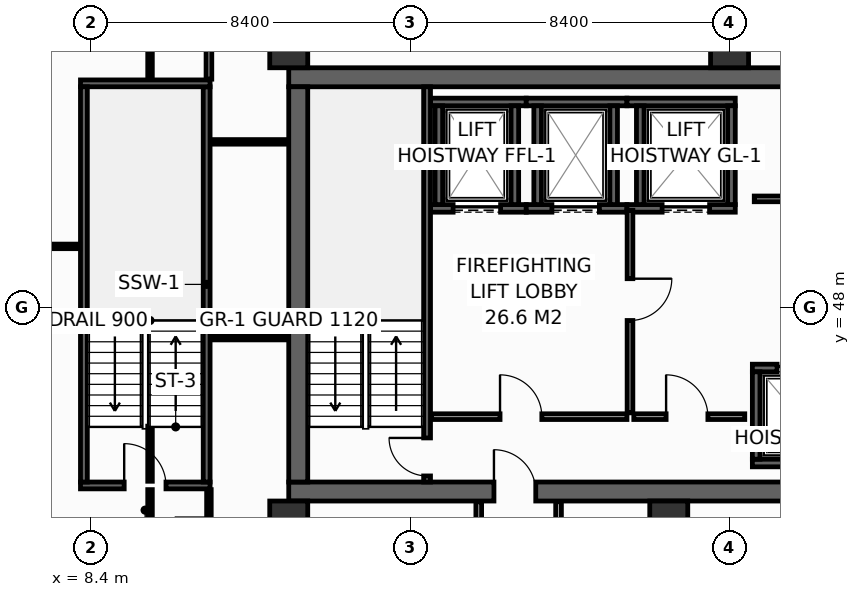
"""IFC4 building model, lengths in metres.
Left out: names, types, materials, properties, quantities, classifications, styles, units other than length and angle.
Written with IfcOpenShell. Run it as: python <this file> out.ifc"""

import sys

from ifc_helpers import new_model, si_unit, direction, frame, frame_2d, origin, origin_2d, place, context, subcontext, project, spatial, rectangle, hollow_rectangle, extrude, element, fill, save


model = new_model("IFC4")
c1 = context("Model", 3, precision=1e-05, world=origin(), true_north=direction((0.0, 1.0)))
c2 = subcontext(c1, "Body", "Model", "MODEL_VIEW")
j1 = project(units=[si_unit("LENGTHUNIT", "METRE"), si_unit("PLANEANGLEUNIT", "RADIAN")], contexts=[c1])
p1 = place(None, origin())
s1 = spatial("IfcSite", under=j1, at=p1, CompositionType="ELEMENT")
p2 = place(p1, origin())
s2 = spatial("IfcBuilding", under=s1, at=p2, CompositionType="ELEMENT")
p3 = place(p2, frame((0.0, 0.0, 175.2)))
s3 = spatial("IfcBuildingStorey", under=s2, at=p3, CompositionType="ELEMENT", Elevation=175.2)
p4 = place(p3, frame((13.6, 43.15, 0.0), z_axis=(0.0, 0.0, 1.0), x_axis=(1.0, 0.0, 0.0)))
e1 = element("IfcWall", 1, at=p4, inside=s3, PredefinedType="SHEAR", context=c2, shape_type="SweptSolid", body=[
    extrude(rectangle(XDim=32.7, YDim=0.5, at=frame_2d((16.35, 0.0))), origin(), (0.0, 0.0, 1.0), 3.55),
])
p5 = place(p4, frame((5.4, 0.0, 0.0)))
e2 = element("IfcOpeningElement", 2, at=p5, cuts=e1, PredefinedType="OPENING", context=c2, shape_type="SweptSolid", body=[
    extrude(rectangle(XDim=1.1, YDim=2.15, at=frame_2d((0.55, 1.075))), frame((0.0, 0.26, 0.0), z_axis=(0.0, -1.0, 0.0), x_axis=(1.0, 0.0, 0.0)), (0.0, 0.0, 1.0), 0.52),
])
p6 = place(p4, frame((25.6, 0.0, 0.0)))
e3 = element("IfcOpeningElement", 3, at=p6, cuts=e1, PredefinedType="OPENING", context=c2, shape_type="SweptSolid", body=[
    extrude(rectangle(XDim=1.1, YDim=2.15, at=frame_2d((0.55, 1.075))), frame((0.0, 0.26, 0.0), z_axis=(0.0, -1.0, 0.0), x_axis=(1.0, 0.0, 0.0)), (0.0, 0.0, 1.0), 0.52),
])
p7 = place(p3, frame((13.6, 54.05, 0.0), z_axis=(0.0, 0.0, 1.0), x_axis=(1.0, 0.0, 0.0)))
e4 = element("IfcWall", 4, at=p7, inside=s3, PredefinedType="SHEAR", context=c2, shape_type="SweptSolid", body=[
    extrude(rectangle(XDim=32.7, YDim=0.5, at=frame_2d((16.35, 0.0))), origin(), (0.0, 0.0, 1.0), 3.55),
])
p8 = place(p3, frame((13.85, 43.4, 0.0), z_axis=(0.0, 0.0, 1.0), x_axis=(0.0, 1.0, 0.0)))
e5 = element("IfcWall", 5, at=p8, inside=s3, PredefinedType="SHEAR", context=c2, shape_type="SweptSolid", body=[
    extrude(rectangle(XDim=10.4, YDim=0.5, at=frame_2d((5.2, 0.0))), origin(), (0.0, 0.0, 1.0), 3.55),
])
for number, where, z_axis, x_axis in (
    (6, (13.6, 54.8, 0.0), (0.0, 0.0, 1.0), (1.0, 0.0, 0.0)),
    (7, (25.2, 54.8, 0.0), (0.0, 0.0, 1.0), (1.0, 0.0, 0.0)),
    (8, (13.6, 42.4, 0.0), (0.0, 0.0, 1.0), (1.0, 0.0, 0.0)),
    (9, (23.6, 42.4, 0.0), (0.0, 0.0, 1.0), (1.0, 0.0, 0.0)),
):
    element("IfcColumn", number, at=place(p3, frame(where, z_axis=z_axis, x_axis=x_axis)), inside=s3, PredefinedType="COLUMN", context=c2, shape_type="SweptSolid", body=[
        extrude(hollow_rectangle(XDim=1.0, YDim=1.0, WallThickness=0.045, at=origin_2d()), origin(), (0.0, 0.0, 1.0), 3.8),
    ])
p9 = place(p3, frame((17.33, 50.6, 0.0), z_axis=(0.0, 0.0, 1.0), x_axis=(1.0, 0.0, 0.0)))
e10 = element("IfcWall", 10, at=p9, inside=s3, PredefinedType="SHEAR", context=c2, shape_type="SweptSolid", body=[
    extrude(rectangle(XDim=2.52, YDim=0.2, at=frame_2d((1.26, 0.0))), origin(), (0.0, 0.0, 1.0), 3.55),
])
p10 = place(p9, frame((0.595, 0.0, 0.0)))
e11 = element("IfcOpeningElement", 11, at=p10, cuts=e10, PredefinedType="OPENING", context=c2, shape_type="SweptSolid", body=[
    extrude(rectangle(XDim=1.25, YDim=2.3, at=frame_2d((0.625, 1.15))), frame((0.0, 0.11, 0.0), z_axis=(0.0, -1.0, 0.0), x_axis=(1.0, 0.0, 0.0)), (0.0, 0.0, 1.0), 0.22),
])
p11 = place(p3, frame((17.33, 53.4, 0.0), z_axis=(0.0, 0.0, 1.0), x_axis=(1.0, 0.0, 0.0)))
e12 = element("IfcWall", 12, at=p11, inside=s3, PredefinedType="SHEAR", context=c2, shape_type="SweptSolid", body=[
    extrude(rectangle(XDim=2.52, YDim=0.2, at=frame_2d((1.26, 0.0))), origin(), (0.0, 0.0, 1.0), 3.55),
])
for number, where, z_axis, x_axis in (
    (13, (17.55, 50.7, 0.0), (0.0, 0.0, 1.0), (0.0, 1.0, 0.0)),
    (14, (19.55, 50.7, 0.0), (0.0, 0.0, 1.0), (0.0, 1.0, 0.0)),
):
    element("IfcWall", number, at=place(p3, frame(where, z_axis=z_axis, x_axis=x_axis)), inside=s3, PredefinedType="SHEAR", context=c2, shape_type="SweptSolid", body=[
        extrude(rectangle(XDim=2.6, YDim=0.2, at=frame_2d((1.3, 0.0))), origin(), (0.0, 0.0, 1.0), 3.55),
    ])
p12 = place(p3, frame((19.85, 50.6, 0.0), z_axis=(0.0, 0.0, 1.0), x_axis=(1.0, 0.0, 0.0)))
e15 = element("IfcWall", 15, at=p12, inside=s3, PredefinedType="SHEAR", context=c2, shape_type="SweptSolid", body=[
    extrude(rectangle(XDim=2.65, YDim=0.2, at=frame_2d((1.325, 0.0))), origin(), (0.0, 0.0, 1.0), 3.55),
])
p13 = place(p12, frame((0.675, 0.0, 0.0)))
e16 = element("IfcOpeningElement", 16, at=p13, cuts=e15, PredefinedType="OPENING", context=c2, shape_type="SweptSolid", body=[
    extrude(rectangle(XDim=1.25, YDim=2.3, at=frame_2d((0.625, 1.15))), frame((0.0, 0.11, 0.0), z_axis=(0.0, -1.0, 0.0), x_axis=(1.0, 0.0, 0.0)), (0.0, 0.0, 1.0), 0.22),
])
p14 = place(p3, frame((19.85, 53.4, 0.0), z_axis=(0.0, 0.0, 1.0), x_axis=(1.0, 0.0, 0.0)))
e17 = element("IfcWall", 17, at=p14, inside=s3, PredefinedType="SHEAR", context=c2, shape_type="SweptSolid", body=[
    extrude(rectangle(XDim=2.65, YDim=0.2, at=frame_2d((1.325, 0.0))), origin(), (0.0, 0.0, 1.0), 3.55),
])
for number, where, z_axis, x_axis in (
    (18, (20.15, 50.7, 0.0), (0.0, 0.0, 1.0), (0.0, 1.0, 0.0)),
    (19, (22.15, 50.7, 0.0), (0.0, 0.0, 1.0), (0.0, 1.0, 0.0)),
):
    element("IfcWall", number, at=place(p3, frame(where, z_axis=z_axis, x_axis=x_axis)), inside=s3, PredefinedType="SHEAR", context=c2, shape_type="SweptSolid", body=[
        extrude(rectangle(XDim=2.6, YDim=0.2, at=frame_2d((1.3, 0.0))), origin(), (0.0, 0.0, 1.0), 3.55),
    ])
p15 = place(p3, frame((22.5, 50.6, 0.0), z_axis=(0.0, 0.0, 1.0), x_axis=(1.0, 0.0, 0.0)))
e20 = element("IfcWall", 20, at=p15, inside=s3, PredefinedType="SHEAR", context=c2, shape_type="SweptSolid", body=[
    extrude(rectangle(XDim=2.85, YDim=0.2, at=frame_2d((1.425, 0.0))), origin(), (0.0, 0.0, 1.0), 3.55),
])
p16 = place(p15, frame((0.925, 0.0, 0.0)))
e21 = element("IfcOpeningElement", 21, at=p16, cuts=e20, PredefinedType="OPENING", context=c2, shape_type="SweptSolid", body=[
    extrude(rectangle(XDim=1.25, YDim=2.3, at=frame_2d((0.625, 1.15))), frame((0.0, 0.11, 0.0), z_axis=(0.0, -1.0, 0.0), x_axis=(1.0, 0.0, 0.0)), (0.0, 0.0, 1.0), 0.22),
])
p17 = place(p3, frame((22.5, 53.4, 0.0), z_axis=(0.0, 0.0, 1.0), x_axis=(1.0, 0.0, 0.0)))
e22 = element("IfcWall", 22, at=p17, inside=s3, PredefinedType="SHEAR", context=c2, shape_type="SweptSolid", body=[
    extrude(rectangle(XDim=2.85, YDim=0.2, at=frame_2d((1.425, 0.0))), origin(), (0.0, 0.0, 1.0), 3.55),
])
for number, where, z_axis, x_axis in (
    (23, (22.85, 50.7, 0.0), (0.0, 0.0, 1.0), (0.0, 1.0, 0.0)),
    (24, (25.25, 50.7, 0.0), (0.0, 0.0, 1.0), (0.0, 1.0, 0.0)),
):
    element("IfcWall", number, at=place(p3, frame(where, z_axis=z_axis, x_axis=x_axis)), inside=s3, PredefinedType="SHEAR", context=c2, shape_type="SweptSolid", body=[
        extrude(rectangle(XDim=2.6, YDim=0.2, at=frame_2d((1.3, 0.0))), origin(), (0.0, 0.0, 1.0), 3.55),
    ])
p18 = place(p3, frame((25.8, 43.9, 0.0), z_axis=(0.0, 0.0, 1.0), x_axis=(1.0, 0.0, 0.0)))
e25 = element("IfcWall", 25, at=p18, inside=s3, PredefinedType="SHEAR", context=c2, shape_type="SweptSolid", body=[
    extrude(rectangle(XDim=2.575, YDim=0.2, at=frame_2d((1.288, 0.0))), origin(), (0.0, 0.0, 1.0), 3.55),
])
p19 = place(p3, frame((25.8, 46.4, 0.0), z_axis=(0.0, 0.0, 1.0), x_axis=(1.0, 0.0, 0.0)))
e26 = element("IfcWall", 26, at=p19, inside=s3, PredefinedType="SHEAR", context=c2, shape_type="SweptSolid", body=[
    extrude(rectangle(XDim=2.575, YDim=0.2, at=frame_2d((1.288, 0.0))), origin(), (0.0, 0.0, 1.0), 3.55),
])
p20 = place(p19, frame((0.65, 0.0, 0.0)))
e27 = element("IfcOpeningElement", 27, at=p20, cuts=e26, PredefinedType="OPENING", context=c2, shape_type="SweptSolid", body=[
    extrude(rectangle(XDim=1.1, YDim=2.2, at=frame_2d((0.55, 1.1))), frame((0.0, 0.11, 0.0), z_axis=(0.0, -1.0, 0.0), x_axis=(1.0, 0.0, 0.0)), (0.0, 0.0, 1.0), 0.22),
])
p21 = place(p3, frame((25.9, 44.0, 0.0), z_axis=(0.0, 0.0, 1.0), x_axis=(0.0, 1.0, 0.0)))
e28 = element("IfcWall", 28, at=p21, inside=s3, PredefinedType="SHEAR", context=c2, shape_type="SweptSolid", body=[
    extrude(rectangle(XDim=2.3, YDim=0.2, at=frame_2d((1.15, 0.0))), origin(), (0.0, 0.0, 1.0), 3.55),
])
p22 = place(p3, frame((17.24, 43.4, 0.0), z_axis=(0.0, 0.0, 1.0), x_axis=(0.0, 1.0, 0.0)))
e29 = element("IfcWall", 29, at=p22, inside=s3, PredefinedType="SHEAR", context=c2, shape_type="SweptSolid", body=[
    extrude(rectangle(XDim=10.4, YDim=0.18, at=frame_2d((5.2, 0.0))), origin(), (0.0, 0.0, 1.0), 3.55),
])
p23 = place(p22, frame((0.16, 0.0, 0.0)))
e30 = element("IfcOpeningElement", 30, at=p23, cuts=e29, PredefinedType="OPENING", context=c2, shape_type="SweptSolid", body=[
    extrude(rectangle(XDim=1.0, YDim=2.15, at=frame_2d((0.5, 1.075))), frame((0.0, 0.1, 0.0), z_axis=(0.0, -1.0, 0.0), x_axis=(1.0, 0.0, 0.0)), (0.0, 0.0, 1.0), 0.2),
])
p24 = place(p3, frame((8.12, 43.31, 0.0), z_axis=(0.0, 0.0, 1.0), x_axis=(1.0, 0.0, 0.0)))
e31 = element("IfcWall", 31, at=p24, inside=s3, PredefinedType="SHEAR", context=c2, shape_type="SweptSolid", body=[
    extrude(rectangle(XDim=3.41, YDim=0.18, at=frame_2d((1.705, 0.0))), origin(), (0.0, 0.0, 1.0), 3.55),
])
p25 = place(p24, frame((1.15, 0.0, 0.0)))
e32 = element("IfcOpeningElement", 32, at=p25, cuts=e31, PredefinedType="OPENING", context=c2, shape_type="SweptSolid", body=[
    extrude(rectangle(XDim=1.1, YDim=2.15, at=frame_2d((0.55, 1.075))), frame((0.0, 0.1, 0.0), z_axis=(0.0, -1.0, 0.0), x_axis=(1.0, 0.0, 0.0)), (0.0, 0.0, 1.0), 0.2),
])
p26 = place(p3, frame((11.44, 43.4, 0.0), z_axis=(0.0, 0.0, 1.0), x_axis=(0.0, 1.0, 0.0)))
e33 = element("IfcWall", 33, at=p26, inside=s3, PredefinedType="SHEAR", context=c2, shape_type="SweptSolid", body=[
    extrude(rectangle(XDim=10.4, YDim=0.18, at=frame_2d((5.2, 0.0))), origin(), (0.0, 0.0, 1.0), 3.55),
])
p27 = place(p3, frame((11.53, 53.89, 0.0), z_axis=(0.0, 0.0, 1.0), x_axis=(-1.0, 0.0, 0.0)))
e34 = element("IfcWall", 34, at=p27, inside=s3, PredefinedType="SHEAR", context=c2, shape_type="SweptSolid", body=[
    extrude(rectangle(XDim=3.41, YDim=0.18, at=frame_2d((1.705, 0.0))), origin(), (0.0, 0.0, 1.0), 3.55),
])
p28 = place(p3, frame((8.21, 53.8, 0.0), z_axis=(0.0, 0.0, 1.0), x_axis=(0.0, -1.0, 0.0)))
e35 = element("IfcWall", 35, at=p28, inside=s3, PredefinedType="SHEAR", context=c2, shape_type="SweptSolid", body=[
    extrude(rectangle(XDim=10.4, YDim=0.18, at=frame_2d((5.2, 0.0))), origin(), (0.0, 0.0, 1.0), 3.55),
])
p29 = place(p3, frame((17.36, 45.12, 0.0), z_axis=(0.0, 0.0, 1.0), x_axis=(1.0, 0.0, 0.0)))
e36 = element("IfcWall", 36, at=p29, inside=s3, PredefinedType="PARTITIONING", context=c2, shape_type="SweptSolid", body=[
    extrude(rectangle(XDim=5.14, YDim=0.15, at=frame_2d((2.57, 0.0))), origin(), (0.0, 0.0, 1.0), 3.55),
])
p30 = place(p29, frame((1.8, 0.0, 0.0)))
e37 = element("IfcOpeningElement", 37, at=p30, cuts=e36, PredefinedType="OPENING", context=c2, shape_type="SweptSolid", body=[
    extrude(rectangle(XDim=1.1, YDim=2.15, at=frame_2d((0.55, 1.075))), frame((0.0, 0.085, 0.0), z_axis=(0.0, -1.0, 0.0), x_axis=(1.0, 0.0, 0.0)), (0.0, 0.0, 1.0), 0.17),
])
p31 = place(p3, frame((22.58, 50.55, 0.0), z_axis=(0.0, 0.0, 1.0), x_axis=(0.0, -1.0, 0.0)))
e38 = element("IfcWall", 38, at=p31, inside=s3, PredefinedType="PARTITIONING", context=c2, shape_type="SweptSolid", body=[
    extrude(rectangle(XDim=5.33, YDim=0.15, at=frame_2d((2.665, 0.0))), origin(), (0.0, 0.0, 1.0), 3.55),
])
p32 = place(p31, frame((1.8, 0.0, 0.0)))
e39 = element("IfcOpeningElement", 39, at=p32, cuts=e38, PredefinedType="OPENING", context=c2, shape_type="SweptSolid", body=[
    extrude(rectangle(XDim=1.1, YDim=2.15, at=frame_2d((0.55, 1.075))), frame((0.0, 0.085, 0.0), z_axis=(0.0, -1.0, 0.0), x_axis=(1.0, 0.0, 0.0)), (0.0, 0.0, 1.0), 0.17),
])
p33 = place(p3, frame((22.68, 45.12, 0.0), z_axis=(0.0, 0.0, 1.0), x_axis=(1.0, 0.0, 0.0)))
e40 = element("IfcWall", 40, at=p33, inside=s3, PredefinedType="PARTITIONING", context=c2, shape_type="SweptSolid", body=[
    extrude(rectangle(XDim=2.92, YDim=0.15, at=frame_2d((1.46, 0.0))), origin(), (0.0, 0.0, 1.0), 3.55),
])
p34 = place(p33, frame((0.85, 0.0, 0.0)))
e41 = element("IfcOpeningElement", 41, at=p34, cuts=e40, PredefinedType="OPENING", context=c2, shape_type="SweptSolid", body=[
    extrude(rectangle(XDim=1.1, YDim=2.15, at=frame_2d((0.55, 1.075))), frame((0.0, 0.085, 0.0), z_axis=(0.0, -1.0, 0.0), x_axis=(1.0, 0.0, 0.0)), (0.0, 0.0, 1.0), 0.17),
])
p35 = place(p3, frame((25.85, 50.85, 0.0), z_axis=(0.0, 0.0, 1.0), x_axis=(1.0, 0.0, 0.0)))
e42 = element("IfcWall", 42, at=p35, inside=s3, PredefinedType="PARTITIONING", context=c2, shape_type="SweptSolid", body=[
    extrude(rectangle(XDim=7.65, YDim=0.15, at=frame_2d((3.825, 0.0))), origin(), (0.0, 0.0, 1.0), 3.55),
])
p36 = place(p35, frame((1.25, 0.0, 0.0)))
e43 = element("IfcOpeningElement", 43, at=p36, cuts=e42, PredefinedType="OPENING", context=c2, shape_type="SweptSolid", body=[
    extrude(rectangle(XDim=0.95, YDim=2.15, at=frame_2d((0.475, 1.075))), frame((0.0, 0.085, 0.0), z_axis=(0.0, -1.0, 0.0), x_axis=(1.0, 0.0, 0.0)), (0.0, 0.0, 1.0), 0.17),
])
p37 = place(p3, frame((11.55, 52.35, 0.0), z_axis=(0.0, 0.0, 1.0), x_axis=(1.0, 0.0, 0.0)))
e44 = element("IfcWall", 44, at=p37, inside=s3, PredefinedType="PARTITIONING", context=c2, shape_type="SweptSolid", body=[
    extrude(rectangle(XDim=2.03, YDim=0.12, at=frame_2d((1.015, 0.0))), origin(), (0.0, 0.0, 1.0), 3.55),
])
p38 = place(p3, frame((11.5, 54.0, 0.0), z_axis=(0.0, 0.0, 1.0), x_axis=(0.0, 1.0, 0.0)))
e45 = element("IfcWall", 45, at=p38, inside=s3, PredefinedType="PARTITIONING", context=c2, shape_type="SweptSolid", body=[
    extrude(rectangle(XDim=1.995, YDim=0.15, at=frame_2d((0.998, 0.0))), origin(), (0.0, 0.0, 1.0), 2.935),
])
p39 = place(p3, frame((4.547, 49.6, 0.0), z_axis=(0.0, 0.0, 1.0), x_axis=(1.0, 0.0, 0.0)))
e46 = element("IfcWall", 46, at=p39, inside=s3, PredefinedType="PARTITIONING", context=c2, shape_type="SweptSolid", body=[
    extrude(rectangle(XDim=3.553, YDim=0.12, at=frame_2d((1.777, 0.0))), origin(), (0.0, 0.0, 1.0), 2.835),
])
p40 = place(p3, frame((9.95, 40.83, 0.0), z_axis=(0.0, 0.0, 1.0), x_axis=(0.0, 1.0, 0.0)))
e47 = element("IfcWall", 47, at=p40, inside=s3, PredefinedType="PARTITIONING", context=c2, shape_type="SweptSolid", body=[
    extrude(rectangle(XDim=2.37, YDim=0.12, at=frame_2d((1.185, 0.0))), origin(), (0.0, 0.0, 1.0), 2.835),
])
p41 = place(p40, frame((0.735, 0.0, 0.0)))
e48 = element("IfcOpeningElement", 48, at=p41, cuts=e47, PredefinedType="OPENING", context=c2, shape_type="SweptSolid", body=[
    extrude(rectangle(XDim=0.9, YDim=2.1, at=frame_2d((0.45, 1.05))), frame((0.0, 0.07, 0.0), z_axis=(0.0, -1.0, 0.0), x_axis=(1.0, 0.0, 0.0)), (0.0, 0.0, 1.0), 0.14),
])
p42 = place(p3, frame((9.95, 43.42, 0.0), z_axis=(0.0, 0.0, 1.0), x_axis=(0.0, 1.0, 0.0)))
e49 = element("IfcWall", 49, at=p42, inside=s3, PredefinedType="PARTITIONING", context=c2, shape_type="SweptSolid", body=[
    extrude(rectangle(XDim=1.45, YDim=0.12, at=frame_2d((0.725, 0.0))), origin(), (0.0, 0.0, 1.0), 3.55),
])
p43 = place(p3, frame((9.95, 54.0, 0.0), z_axis=(0.0, 0.0, 1.0), x_axis=(0.0, 1.0, 0.0)))
e50 = element("IfcWall", 50, at=p43, inside=s3, PredefinedType="PARTITIONING", context=c2, shape_type="SweptSolid", body=[
    extrude(rectangle(XDim=1.995, YDim=0.12, at=frame_2d((0.998, 0.0))), origin(), (0.0, 0.0, 1.0), 2.935),
])
p44 = place(p3, frame((11.55, 47.2, 0.0), z_axis=(0.0, 0.0, 1.0), x_axis=(1.0, 0.0, 0.0)))
e51 = element("IfcWall", 51, at=p44, inside=s3, PredefinedType="PARTITIONING", context=c2, shape_type="SweptSolid", body=[
    extrude(rectangle(XDim=2.03, YDim=0.12, at=frame_2d((1.015, 0.0))), origin(), (0.0, 0.0, 1.0), 3.55),
])
p45 = place(p3, frame((11.5, 40.83, 0.0), z_axis=(0.0, 0.0, 1.0), x_axis=(0.0, 1.0, 0.0)))
e52 = element("IfcWall", 52, at=p45, inside=s3, PredefinedType="PARTITIONING", context=c2, shape_type="SweptSolid", body=[
    extrude(rectangle(XDim=2.37, YDim=0.12, at=frame_2d((1.185, 0.0))), origin(), (0.0, 0.0, 1.0), 2.835),
])
p46 = place(p45, frame((0.735, 0.0, 0.0)))
e53 = element("IfcOpeningElement", 53, at=p46, cuts=e52, PredefinedType="OPENING", context=c2, shape_type="SweptSolid", body=[
    extrude(rectangle(XDim=0.9, YDim=2.1, at=frame_2d((0.45, 1.05))), frame((0.0, 0.07, 0.0), z_axis=(0.0, -1.0, 0.0), x_axis=(1.0, 0.0, 0.0)), (0.0, 0.0, 1.0), 0.14),
])
p47 = place(p3, frame((13.8, 40.83, 0.0), z_axis=(0.0, 0.0, 1.0), x_axis=(0.0, 1.0, 0.0)))
e54 = element("IfcWall", 54, at=p47, inside=s3, PredefinedType="PARTITIONING", context=c2, shape_type="SweptSolid", body=[
    extrude(rectangle(XDim=2.05, YDim=0.15, at=frame_2d((1.025, 0.0))), origin(), (0.0, 0.0, 1.0), 3.55),
])
for number, where, z_axis, x_axis in (
    (55, (18.6, 40.75, 0.0), (0.0, 0.0, 1.0), (0.0, 1.0, 0.0)),
    (56, (20.7, 40.75, 0.0), (0.0, 0.0, 1.0), (0.0, 1.0, 0.0)),
):
    element("IfcWall", number, at=place(p3, frame(where, z_axis=z_axis, x_axis=x_axis)), inside=s3, PredefinedType="PARTITIONING", context=c2, shape_type="SweptSolid", body=[
        extrude(rectangle(XDim=2.13, YDim=0.15, at=frame_2d((1.065, 0.0))), origin(), (0.0, 0.0, 1.0), 3.55),
    ])
p48 = place(p10, origin())
e57 = element("IfcDoor", 57, at=p48, inside=s3, OperationType="SLIDING_TO_LEFT", PredefinedType="DOOR", context=c2, shape_type="SweptSolid", body=[
    extrude(rectangle(XDim=1.25, YDim=2.3, at=frame_2d((0.625, 1.15))), frame((0.0, 0.025, 0.0), z_axis=(0.0, -1.0, 0.0), x_axis=(1.0, 0.0, 0.0)), (0.0, 0.0, 1.0), 0.05),
])
fill(e11, e57)
p49 = place(p13, origin())
e58 = element("IfcDoor", 58, at=p49, inside=s3, OperationType="SLIDING_TO_LEFT", PredefinedType="DOOR", context=c2, shape_type="SweptSolid", body=[
    extrude(rectangle(XDim=1.25, YDim=2.3, at=frame_2d((0.625, 1.15))), frame((0.0, 0.025, 0.0), z_axis=(0.0, -1.0, 0.0), x_axis=(1.0, 0.0, 0.0)), (0.0, 0.0, 1.0), 0.05),
])
fill(e16, e58)
p50 = place(p16, origin())
e59 = element("IfcDoor", 59, at=p50, inside=s3, OperationType="SLIDING_TO_LEFT", PredefinedType="DOOR", context=c2, shape_type="SweptSolid", body=[
    extrude(rectangle(XDim=1.25, YDim=2.3, at=frame_2d((0.625, 1.15))), frame((0.0, 0.025, 0.0), z_axis=(0.0, -1.0, 0.0), x_axis=(1.0, 0.0, 0.0)), (0.0, 0.0, 1.0), 0.05),
])
fill(e21, e59)
p51 = place(p20, origin())
e60 = element("IfcDoor", 60, at=p51, inside=s3, OperationType="SLIDING_TO_LEFT", PredefinedType="DOOR", context=c2, shape_type="SweptSolid", body=[
    extrude(rectangle(XDim=1.1, YDim=2.2, at=frame_2d((0.55, 1.1))), frame((0.0, 0.025, 0.0), z_axis=(0.0, -1.0, 0.0), x_axis=(1.0, 0.0, 0.0)), (0.0, 0.0, 1.0), 0.05),
])
fill(e27, e60)
p52 = place(p23, origin())
e61 = element("IfcDoor", 61, at=p52, inside=s3, OperationType="SINGLE_SWING_RIGHT", PredefinedType="DOOR", context=c2, shape_type="SweptSolid", body=[
    extrude(rectangle(XDim=1.0, YDim=2.15, at=frame_2d((0.5, 1.075))), frame((0.0, 0.025, 0.0), z_axis=(0.0, -1.0, 0.0), x_axis=(1.0, 0.0, 0.0)), (0.0, 0.0, 1.0), 0.05),
])
fill(e30, e61)
p53 = place(p25, origin())
e62 = element("IfcDoor", 62, at=p53, inside=s3, OperationType="SINGLE_SWING_LEFT", PredefinedType="DOOR", context=c2, shape_type="SweptSolid", body=[
    extrude(rectangle(XDim=1.1, YDim=2.15, at=frame_2d((0.55, 1.075))), frame((0.0, 0.025, 0.0), z_axis=(0.0, -1.0, 0.0), x_axis=(1.0, 0.0, 0.0)), (0.0, 0.0, 1.0), 0.05),
])
fill(e32, e62)
p54 = place(p30, origin())
e63 = element("IfcDoor", 63, at=p54, inside=s3, OperationType="SINGLE_SWING_LEFT", PredefinedType="DOOR", context=c2, shape_type="SweptSolid", body=[
    extrude(rectangle(XDim=1.1, YDim=2.15, at=frame_2d((0.55, 1.075))), frame((0.0, 0.025, 0.0), z_axis=(0.0, -1.0, 0.0), x_axis=(1.0, 0.0, 0.0)), (0.0, 0.0, 1.0), 0.05),
])
fill(e37, e63)
p55 = place(p32, origin())
e64 = element("IfcDoor", 64, at=p55, inside=s3, OperationType="SINGLE_SWING_LEFT", PredefinedType="DOOR", context=c2, shape_type="SweptSolid", body=[
    extrude(rectangle(XDim=1.1, YDim=2.15, at=frame_2d((0.55, 1.075))), frame((0.0, 0.025, 0.0), z_axis=(0.0, -1.0, 0.0), x_axis=(1.0, 0.0, 0.0)), (0.0, 0.0, 1.0), 0.05),
])
fill(e39, e64)
p56 = place(p34, origin())
e65 = element("IfcDoor", 65, at=p56, inside=s3, OperationType="SINGLE_SWING_LEFT", PredefinedType="DOOR", context=c2, shape_type="SweptSolid", body=[
    extrude(rectangle(XDim=1.1, YDim=2.15, at=frame_2d((0.55, 1.075))), frame((0.0, 0.025, 0.0), z_axis=(0.0, -1.0, 0.0), x_axis=(1.0, 0.0, 0.0)), (0.0, 0.0, 1.0), 0.05),
])
fill(e41, e65)
p57 = place(p5, origin())
e66 = element("IfcDoor", 66, at=p57, inside=s3, OperationType="SINGLE_SWING_LEFT", PredefinedType="DOOR", context=c2, shape_type="SweptSolid", body=[
    extrude(rectangle(XDim=1.1, YDim=2.15, at=frame_2d((0.55, 1.075))), frame((0.0, 0.025, 0.0), z_axis=(0.0, -1.0, 0.0), x_axis=(1.0, 0.0, 0.0)), (0.0, 0.0, 1.0), 0.05),
])
fill(e2, e66)
save(model, sys.argv[1])
